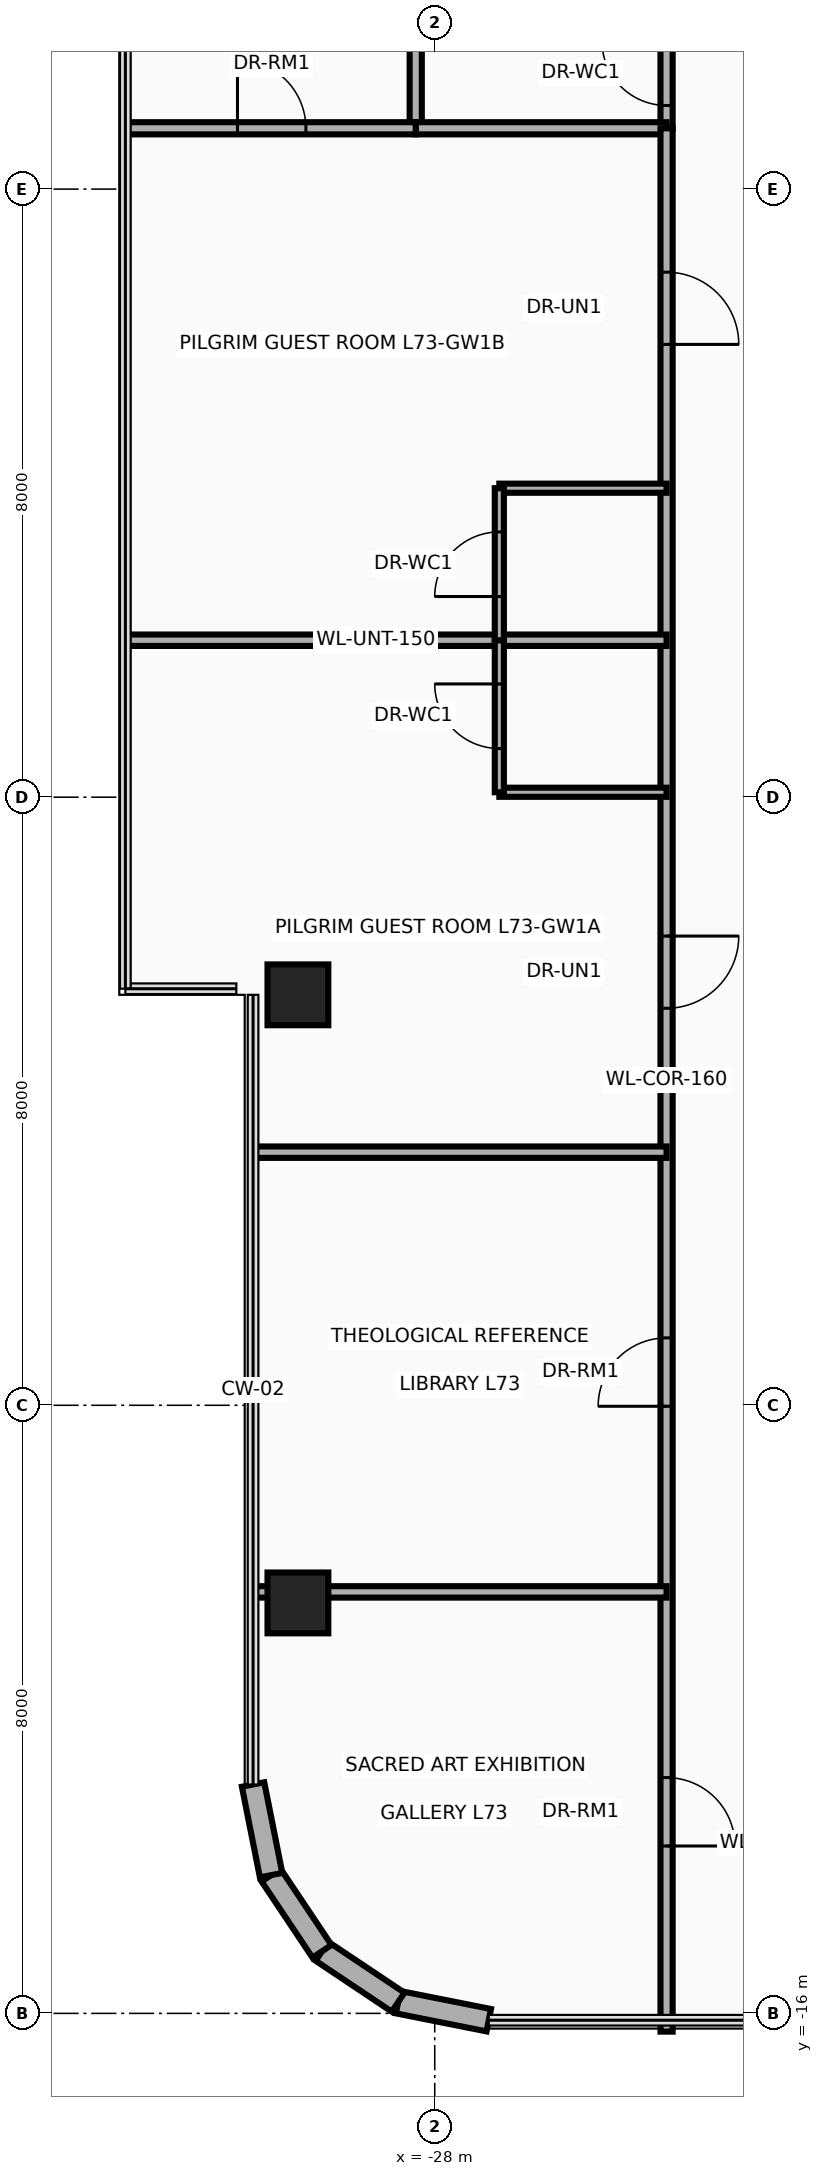
"""IFC4 building model, lengths in metres.
Left out: names, types, materials, properties, quantities, classifications, styles, units other than length and angle.
Written with IfcOpenShell. Run it as: python <this file> out.ifc"""

import sys

from ifc_helpers import new_model, si_unit, direction, frame, frame_2d, origin, origin_2d, place, context, subcontext, project, spatial, rectangle, extrude, source, transform, mapped, element, fill, save


model = new_model("IFC4")
c1 = context("Model", 3, precision=1e-05, world=origin(), true_north=direction((0.0, 1.0)))
c2 = subcontext(c1, "Body", "Model", "MODEL_VIEW")
j1 = project(units=[si_unit("LENGTHUNIT", "METRE"), si_unit("PLANEANGLEUNIT", "RADIAN")], contexts=[c1])
p1 = place(None, origin())
s1 = spatial("IfcSite", under=j1, at=p1, CompositionType="ELEMENT")
p2 = place(p1, origin())
s2 = spatial("IfcBuilding", under=s1, at=p2, CompositionType="ELEMENT")
p3 = place(p2, frame((0.0, 0.0, 280.0)))
s3 = spatial("IfcBuildingStorey", under=s2, at=p3, CompositionType="ELEMENT", Elevation=280.0)
m1 = source(origin(), c2, "Body", "SweptSolid", [
    extrude(rectangle(XDim=0.8, YDim=0.8, at=origin_2d()), origin(), (0.0, 0.0, 1.0), 3.5),
])
for number, where, z_axis, x_axis in (
    (1, (-29.8, -10.6, 0.0), (0.0, 0.0, 1.0), (1.0, 0.0, 0.0)),
    (2, (-29.8, -2.6, 0.0), (0.0, 0.0, 1.0), (1.0, 0.0, 0.0)),
):
    element("IfcColumn", number, at=place(p3, frame(where, z_axis=z_axis, x_axis=x_axis)), inside=s3, PredefinedType="COLUMN", context=c2, shape_type="MappedRepresentation", body=[
        mapped(m1, transform((0.0, 0.0, 0.0), x_axis=(1.0, 0.0, 0.0), y_axis=(0.0, 1.0, 0.0), z_axis=(0.0, 0.0, 1.0), scale=1.0)),
    ])
p4 = place(p3, frame((-27.289, -16.09, 0.0), z_axis=(0.0, 0.0, 1.0), x_axis=(-0.980765602568, 0.195189223115, 0.0)))
e3 = element("IfcWall", 3, at=p4, inside=s3, PredefinedType="SOLIDWALL", context=c2, shape_type="SweptSolid", body=[
    extrude(rectangle(XDim=1.216, YDim=0.3, at=frame_2d((0.608, 0.0))), origin(), (0.0, 0.0, 1.0), 3.26),
])
for number, where, z_axis, x_axis in (
    (4, (-28.482, -15.853, 0.0), (0.0, 0.0, 1.0), (-0.831, 0.556, 0.0)),
    (5, (-29.483, -15.183, 0.0), (0.0, 0.0, 1.0), (-0.556, 0.831, 0.0)),
):
    element("IfcWall", number, at=place(p3, frame(where, z_axis=z_axis, x_axis=x_axis)), inside=s3, PredefinedType="SOLIDWALL", context=c2, shape_type="SweptSolid", body=[
        extrude(rectangle(XDim=1.205, YDim=0.3, at=frame_2d((0.603, 0.0))), origin(), (0.0, 0.0, 1.0), 3.26),
    ])
p5 = place(p3, frame((-30.153, -14.182, 0.0), z_axis=(0.0, 0.0, 1.0), x_axis=(-0.194996050505, 0.980804027463, 0.0)))
e6 = element("IfcWall", 6, at=p5, inside=s3, PredefinedType="SOLIDWALL", context=c2, shape_type="SweptSolid", body=[
    extrude(rectangle(XDim=1.216, YDim=0.3, at=frame_2d((0.608, 0.0))), origin(), (0.0, 0.0, 1.0), 3.26),
])
p6 = place(p3, frame((-28.25, 8.8, 0.0), z_axis=(0.0, 0.0, 1.0), x_axis=(0.0, 1.0, 0.0)))
e7 = element("IfcWall", 7, at=p6, inside=s3, PredefinedType="PARTITIONING", context=c2, shape_type="SweptSolid", body=[
    extrude(rectangle(XDim=2.6, YDim=0.16, at=frame_2d((1.3, 0.0))), origin(), (0.0, 0.0, 1.0), 2.623),
])
p7 = place(p3, frame((-24.95, 8.8, 0.0), z_axis=(0.0, 0.0, 1.0), x_axis=(0.0, 1.0, 0.0)))
e8 = element("IfcWall", 8, at=p7, inside=s3, PredefinedType="PARTITIONING", context=c2, shape_type="SweptSolid", body=[
    extrude(rectangle(XDim=2.6, YDim=0.16, at=frame_2d((1.3, 0.0))), origin(), (0.0, 0.0, 1.0), 2.623),
])
p8 = place(p7, frame((0.3, 0.0, 0.0)))
e9 = element("IfcOpeningElement", 9, at=p8, cuts=e8, PredefinedType="OPENING", context=c2, shape_type="SweptSolid", body=[
    extrude(rectangle(XDim=0.85, YDim=2.1, at=frame_2d((0.425, 1.05))), frame((0.0, 0.095, 0.0), z_axis=(0.0, -1.0, 0.0), x_axis=(1.0, 0.0, 0.0)), (0.0, 0.0, 1.0), 0.19),
])
p9 = place(p7, frame((1.45, 0.0, 0.0)))
e10 = element("IfcOpeningElement", 10, at=p9, cuts=e8, PredefinedType="OPENING", context=c2, shape_type="SweptSolid", body=[
    extrude(rectangle(XDim=0.85, YDim=2.1, at=frame_2d((0.425, 1.05))), frame((0.0, 0.095, 0.0), z_axis=(0.0, -1.0, 0.0), x_axis=(1.0, 0.0, 0.0)), (0.0, 0.0, 1.0), 0.19),
])
p10 = place(p3, frame((-28.25, 8.8, 0.0), z_axis=(0.0, 0.0, 1.0), x_axis=(1.0, 0.0, 0.0)))
e11 = element("IfcWall", 11, at=p10, inside=s3, PredefinedType="PARTITIONING", context=c2, shape_type="SweptSolid", body=[
    extrude(rectangle(XDim=3.3, YDim=0.16, at=frame_2d((1.65, 0.0))), origin(), (0.0, 0.0, 1.0), 3.26),
])
p11 = place(p3, frame((-24.95, -16.24, 0.0), z_axis=(0.0, 0.0, 1.0), x_axis=(0.0, 1.0, 0.0)))
e12 = element("IfcWall", 12, at=p11, inside=s3, PredefinedType="PARTITIONING", context=c2, shape_type="SweptSolid", body=[
    extrude(rectangle(XDim=25.04, YDim=0.16, at=frame_2d((12.52, 0.0))), origin(), (0.0, 0.0, 1.0), 2.623),
])
p12 = place(p11, frame((2.442, 0.0, 0.0)))
e13 = element("IfcOpeningElement", 13, at=p12, cuts=e12, PredefinedType="OPENING", context=c2, shape_type="SweptSolid", body=[
    extrude(rectangle(XDim=0.9, YDim=2.1, at=frame_2d((0.45, 1.05))), frame((0.0, 0.095, 0.0), z_axis=(0.0, -1.0, 0.0), x_axis=(1.0, 0.0, 0.0)), (0.0, 0.0, 1.0), 0.19),
])
p13 = place(p11, frame((8.227, 0.0, 0.0)))
e14 = element("IfcOpeningElement", 14, at=p13, cuts=e12, PredefinedType="OPENING", context=c2, shape_type="SweptSolid", body=[
    extrude(rectangle(XDim=0.9, YDim=2.1, at=frame_2d((0.45, 1.05))), frame((0.0, 0.095, 0.0), z_axis=(0.0, -1.0, 0.0), x_axis=(1.0, 0.0, 0.0)), (0.0, 0.0, 1.0), 0.19),
])
p14 = place(p11, frame((13.463, 0.0, 0.0)))
e15 = element("IfcOpeningElement", 15, at=p14, cuts=e12, PredefinedType="OPENING", context=c2, shape_type="SweptSolid", body=[
    extrude(rectangle(XDim=0.95, YDim=2.15, at=frame_2d((0.475, 1.075))), frame((0.0, 0.095, 0.0), z_axis=(0.0, -1.0, 0.0), x_axis=(1.0, 0.0, 0.0)), (0.0, 0.0, 1.0), 0.19),
])
p15 = place(p11, frame((22.197, 0.0, 0.0)))
e16 = element("IfcOpeningElement", 16, at=p15, cuts=e12, PredefinedType="OPENING", context=c2, shape_type="SweptSolid", body=[
    extrude(rectangle(XDim=0.95, YDim=2.15, at=frame_2d((0.475, 1.075))), frame((0.0, 0.095, 0.0), z_axis=(0.0, -1.0, 0.0), x_axis=(1.0, 0.0, 0.0)), (0.0, 0.0, 1.0), 0.19),
])
p16 = place(p3, frame((-32.04, 8.8, 0.0), z_axis=(0.0, 0.0, 1.0), x_axis=(1.0, 0.0, 0.0)))
e17 = element("IfcWall", 17, at=p16, inside=s3, PredefinedType="PARTITIONING", context=c2, shape_type="SweptSolid", body=[
    extrude(rectangle(XDim=3.79, YDim=0.16, at=frame_2d((1.895, 0.0))), origin(), (0.0, 0.0, 1.0), 2.706),
])
p17 = place(p16, frame((1.445, 0.0, 0.0)))
e18 = element("IfcOpeningElement", 18, at=p17, cuts=e17, PredefinedType="OPENING", context=c2, shape_type="SweptSolid", body=[
    extrude(rectangle(XDim=0.9, YDim=2.1, at=frame_2d((0.45, 1.05))), frame((0.0, 0.095, 0.0), z_axis=(0.0, -1.0, 0.0), x_axis=(1.0, 0.0, 0.0)), (0.0, 0.0, 1.0), 0.19),
])
p18 = place(p3, frame((-30.39, -4.67, 0.0), z_axis=(0.0, 0.0, 1.0), x_axis=(1.0, 0.0, 0.0)))
e19 = element("IfcWall", 19, at=p18, inside=s3, PredefinedType="PARTITIONING", context=c2, shape_type="SweptSolid", body=[
    extrude(rectangle(XDim=5.44, YDim=0.15, at=frame_2d((2.72, 0.0))), origin(), (0.0, 0.0, 1.0), 2.706),
])
p19 = place(p3, frame((-30.39, -10.455, 0.0), z_axis=(0.0, 0.0, 1.0), x_axis=(1.0, 0.0, 0.0)))
e20 = element("IfcWall", 20, at=p19, inside=s3, PredefinedType="PARTITIONING", context=c2, shape_type="SweptSolid", body=[
    extrude(rectangle(XDim=5.44, YDim=0.15, at=frame_2d((2.72, 0.0))), origin(), (0.0, 0.0, 1.0), 2.623),
])
p20 = place(p3, frame((-32.04, 2.065, 0.0), z_axis=(0.0, 0.0, 1.0), x_axis=(1.0, 0.0, 0.0)))
e21 = element("IfcWall", 21, at=p20, inside=s3, PredefinedType="PARTITIONING", context=c2, shape_type="SweptSolid", body=[
    extrude(rectangle(XDim=7.09, YDim=0.15, at=frame_2d((3.545, 0.0))), origin(), (0.0, 0.0, 1.0), 2.706),
])
p21 = place(p3, frame((-27.15, 0.065, 0.0), z_axis=(0.0, 0.0, 1.0), x_axis=(1.0, 0.0, 0.0)))
e22 = element("IfcWall", 22, at=p21, inside=s3, PredefinedType="PARTITIONING", context=c2, shape_type="SweptSolid", body=[
    extrude(rectangle(XDim=2.2, YDim=0.12, at=frame_2d((1.1, 0.0))), origin(), (0.0, 0.0, 1.0), 2.839),
])
p22 = place(p3, frame((-27.15, 0.065, 0.0), z_axis=(0.0, 0.0, 1.0), x_axis=(0.0, 1.0, 0.0)))
e23 = element("IfcWall", 23, at=p22, inside=s3, PredefinedType="PARTITIONING", context=c2, shape_type="SweptSolid", body=[
    extrude(rectangle(XDim=2.0, YDim=0.12, at=frame_2d((1.0, 0.0))), origin(), (0.0, 0.0, 1.0), 2.839),
])
p23 = place(p22, frame((0.575, 0.0, 0.0)))
e24 = element("IfcOpeningElement", 24, at=p23, cuts=e23, PredefinedType="OPENING", context=c2, shape_type="SweptSolid", body=[
    extrude(rectangle(XDim=0.85, YDim=2.1, at=frame_2d((0.425, 1.05))), frame((0.0, 0.075, 0.0), z_axis=(0.0, -1.0, 0.0), x_axis=(1.0, 0.0, 0.0)), (0.0, 0.0, 1.0), 0.15),
])
p24 = place(p3, frame((-27.15, 4.065, 0.0), z_axis=(0.0, 0.0, 1.0), x_axis=(1.0, 0.0, 0.0)))
e25 = element("IfcWall", 25, at=p24, inside=s3, PredefinedType="PARTITIONING", context=c2, shape_type="SweptSolid", body=[
    extrude(rectangle(XDim=2.2, YDim=0.12, at=frame_2d((1.1, 0.0))), origin(), (0.0, 0.0, 1.0), 3.26),
])
p25 = place(p3, frame((-27.15, 2.065, 0.0), z_axis=(0.0, 0.0, 1.0), x_axis=(0.0, 1.0, 0.0)))
e26 = element("IfcWall", 26, at=p25, inside=s3, PredefinedType="PARTITIONING", context=c2, shape_type="SweptSolid", body=[
    extrude(rectangle(XDim=2.0, YDim=0.12, at=frame_2d((1.0, 0.0))), origin(), (0.0, 0.0, 1.0), 2.839),
])
p26 = place(p25, frame((0.575, 0.0, 0.0)))
e27 = element("IfcOpeningElement", 27, at=p26, cuts=e26, PredefinedType="OPENING", context=c2, shape_type="SweptSolid", body=[
    extrude(rectangle(XDim=0.85, YDim=2.1, at=frame_2d((0.425, 1.05))), frame((0.0, 0.075, 0.0), z_axis=(0.0, -1.0, 0.0), x_axis=(1.0, 0.0, 0.0)), (0.0, 0.0, 1.0), 0.15),
])
p27 = place(p8, origin())
e28 = element("IfcDoor", 28, at=p27, inside=s3, OperationType="SINGLE_SWING_RIGHT", PredefinedType="DOOR", context=c2, shape_type="SweptSolid", body=[
    extrude(rectangle(XDim=0.85, YDim=2.1, at=frame_2d((0.425, 1.05))), frame((0.0, 0.025, 0.0), z_axis=(0.0, -1.0, 0.0), x_axis=(1.0, 0.0, 0.0)), (0.0, 0.0, 1.0), 0.05),
])
fill(e9, e28)
p28 = place(p17, origin())
e29 = element("IfcDoor", 29, at=p28, inside=s3, OperationType="SINGLE_SWING_RIGHT", PredefinedType="DOOR", context=c2, shape_type="SweptSolid", body=[
    extrude(rectangle(XDim=0.9, YDim=2.1, at=frame_2d((0.45, 1.05))), frame((0.0, 0.025, 0.0), z_axis=(0.0, -1.0, 0.0), x_axis=(1.0, 0.0, 0.0)), (0.0, 0.0, 1.0), 0.05),
])
fill(e18, e29)
p29 = place(p12, frame((0.9, 0.0, 0.0), z_axis=(0.0, 0.0, 1.0), x_axis=(-1.0, 0.0, 0.0)))
e30 = element("IfcDoor", 30, at=p29, inside=s3, OperationType="SINGLE_SWING_LEFT", PredefinedType="DOOR", context=c2, shape_type="SweptSolid", body=[
    extrude(rectangle(XDim=0.9, YDim=2.1, at=frame_2d((0.45, 1.05))), frame((0.0, 0.025, 0.0), z_axis=(0.0, -1.0, 0.0), x_axis=(1.0, 0.0, 0.0)), (0.0, 0.0, 1.0), 0.05),
])
fill(e13, e30)
p30 = place(p13, origin())
e31 = element("IfcDoor", 31, at=p30, inside=s3, OperationType="SINGLE_SWING_RIGHT", PredefinedType="DOOR", context=c2, shape_type="SweptSolid", body=[
    extrude(rectangle(XDim=0.9, YDim=2.1, at=frame_2d((0.45, 1.05))), frame((0.0, 0.025, 0.0), z_axis=(0.0, -1.0, 0.0), x_axis=(1.0, 0.0, 0.0)), (0.0, 0.0, 1.0), 0.05),
])
fill(e14, e31)
p31 = place(p14, frame((0.95, 0.0, 0.0), z_axis=(0.0, 0.0, 1.0), x_axis=(-1.0, 0.0, 0.0)))
e32 = element("IfcDoor", 32, at=p31, inside=s3, OperationType="SINGLE_SWING_LEFT", PredefinedType="DOOR", context=c2, shape_type="SweptSolid", body=[
    extrude(rectangle(XDim=0.95, YDim=2.15, at=frame_2d((0.475, 1.075))), frame((0.0, 0.025, 0.0), z_axis=(0.0, -1.0, 0.0), x_axis=(1.0, 0.0, 0.0)), (0.0, 0.0, 1.0), 0.05),
])
fill(e15, e32)
p32 = place(p23, origin())
e33 = element("IfcDoor", 33, at=p32, inside=s3, OperationType="SINGLE_SWING_RIGHT", PredefinedType="DOOR", context=c2, shape_type="SweptSolid", body=[
    extrude(rectangle(XDim=0.85, YDim=2.1, at=frame_2d((0.425, 1.05))), frame((0.0, 0.025, 0.0), z_axis=(0.0, -1.0, 0.0), x_axis=(1.0, 0.0, 0.0)), (0.0, 0.0, 1.0), 0.05),
])
fill(e24, e33)
p33 = place(p15, frame((0.95, 0.0, 0.0), z_axis=(0.0, 0.0, 1.0), x_axis=(-1.0, 0.0, 0.0)))
e34 = element("IfcDoor", 34, at=p33, inside=s3, OperationType="SINGLE_SWING_LEFT", PredefinedType="DOOR", context=c2, shape_type="SweptSolid", body=[
    extrude(rectangle(XDim=0.95, YDim=2.15, at=frame_2d((0.475, 1.075))), frame((0.0, 0.025, 0.0), z_axis=(0.0, -1.0, 0.0), x_axis=(1.0, 0.0, 0.0)), (0.0, 0.0, 1.0), 0.05),
])
fill(e16, e34)
p34 = place(p26, origin())
e35 = element("IfcDoor", 35, at=p34, inside=s3, OperationType="SINGLE_SWING_RIGHT", PredefinedType="DOOR", context=c2, shape_type="SweptSolid", body=[
    extrude(rectangle(XDim=0.85, YDim=2.1, at=frame_2d((0.425, 1.05))), frame((0.0, 0.025, 0.0), z_axis=(0.0, -1.0, 0.0), x_axis=(1.0, 0.0, 0.0)), (0.0, 0.0, 1.0), 0.05),
])
fill(e27, e35)
save(model, sys.argv[1])
